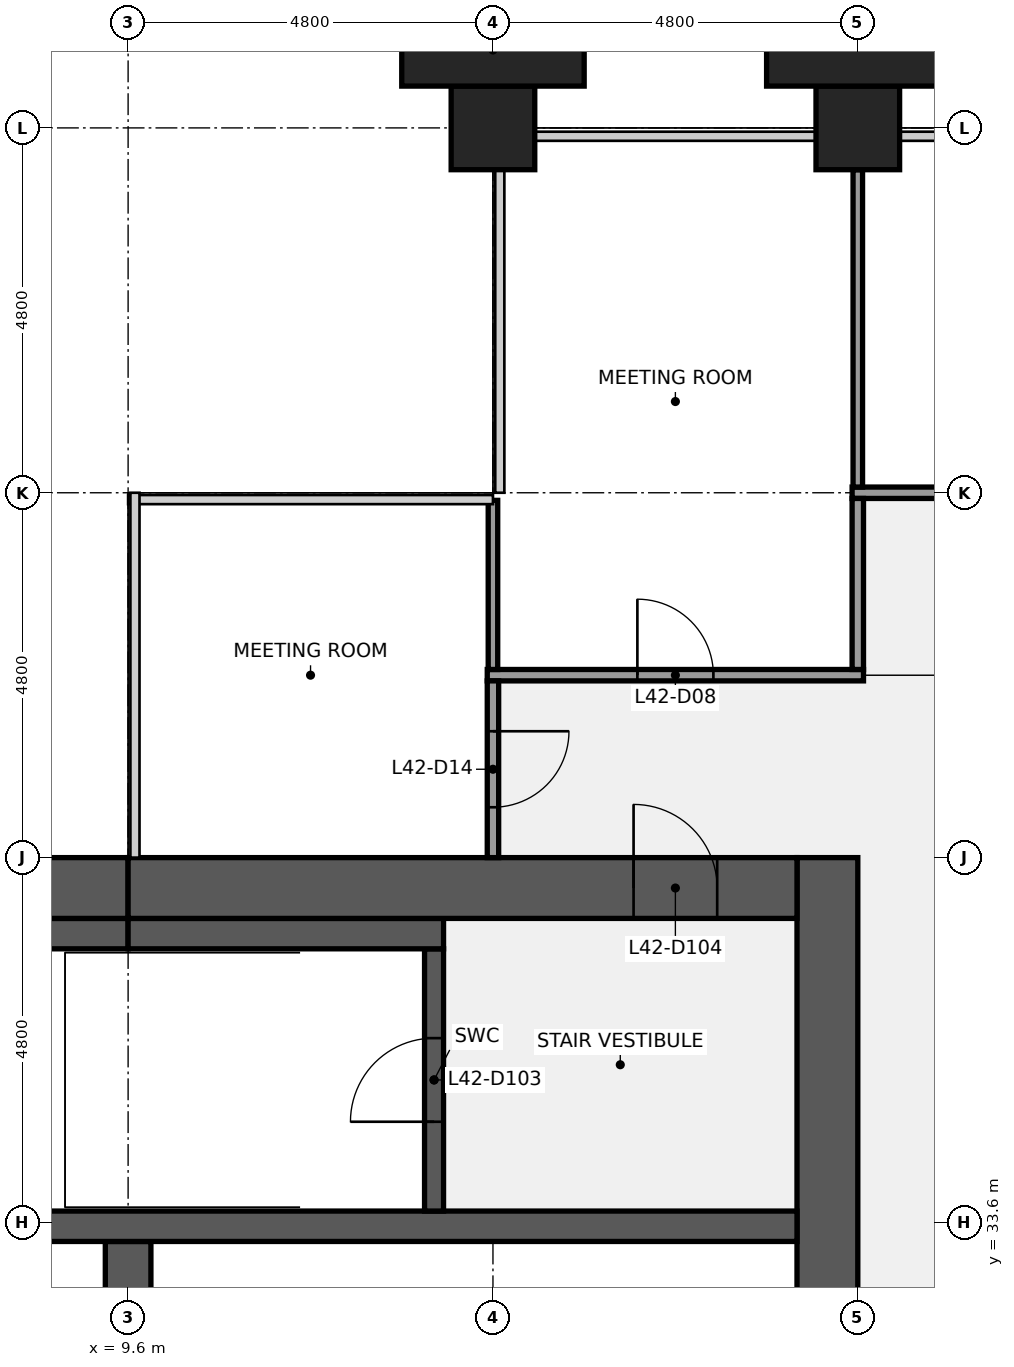
"""IFC4 building model, lengths in metres.
Left out: names, types, materials, properties, quantities, classifications, styles, units other than length and angle.
Written with IfcOpenShell. Run it as: python <this file> out.ifc"""

import sys

from ifc_helpers import new_model, si_unit, direction, frame, frame_2d, origin, origin_2d, place, context, subcontext, project, spatial, rectangle, extrude, element, fill, save


model = new_model("IFC4")
c1 = context("Model", 3, precision=1e-05, world=origin(), true_north=direction((0.0, 1.0)))
c2 = subcontext(c1, "Body", "Model", "MODEL_VIEW")
j1 = project(units=[si_unit("LENGTHUNIT", "METRE"), si_unit("PLANEANGLEUNIT", "RADIAN")], contexts=[c1])
p1 = place(None, origin())
s1 = spatial("IfcSite", under=j1, at=p1, CompositionType="ELEMENT")
p2 = place(p1, origin())
s2 = spatial("IfcBuilding", under=s1, at=p2, CompositionType="ELEMENT")
p3 = place(p2, frame((0.0, 0.0, 197.2)))
s3 = spatial("IfcBuildingStorey", under=s2, at=p3, CompositionType="ELEMENT", Elevation=197.2)
for number, where, z_axis, x_axis in (
    (1, (14.4, 48.0, 0.0), (0.0, 0.0, 1.0), (1.0, 0.0, 0.0)),
    (2, (19.2, 48.0, 0.0), (0.0, 0.0, 1.0), (1.0, 0.0, 0.0)),
):
    element("IfcColumn", number, at=place(p3, frame(where, z_axis=z_axis, x_axis=x_axis)), inside=s3, PredefinedType="COLUMN", context=c2, shape_type="SweptSolid", body=[
        extrude(rectangle(XDim=1.1, YDim=1.1, at=origin_2d()), origin(), (0.0, 0.0, 1.0), 4.0),
    ])
p4 = place(p3, frame((18.8, 38.4, 0.0), z_axis=(0.0, 0.0, 1.0), x_axis=(0.0, -1.0, 0.0)))
e3 = element("IfcWall", 3, at=p4, inside=s3, PredefinedType="SHEAR", context=c2, shape_type="SweptSolid", body=[
    extrude(rectangle(XDim=28.8, YDim=0.8, at=frame_2d((14.4, 0.0))), origin(), (0.0, 0.0, 1.0), 3.84),
])
p5 = place(p4, frame((18.3, 0.0, 0.0)))
e4 = element("IfcOpeningElement", 4, at=p5, cuts=e3, PredefinedType="OPENING", context=c2, shape_type="SweptSolid", body=[
    extrude(rectangle(XDim=1.8, YDim=2.1, at=frame_2d((0.9, 1.05))), frame((0.0, 0.41, 0.0), z_axis=(0.0, -1.0, 0.0), x_axis=(1.0, 0.0, 0.0)), (0.0, 0.0, 1.0), 0.82),
])
p6 = place(p4, frame((8.7, 0.0, 0.0)))
e5 = element("IfcOpeningElement", 5, at=p6, cuts=e3, PredefinedType="OPENING", context=c2, shape_type="SweptSolid", body=[
    extrude(rectangle(XDim=1.8, YDim=2.1, at=frame_2d((0.9, 1.05))), frame((0.0, 0.41, 0.0), z_axis=(0.0, -1.0, 0.0), x_axis=(1.0, 0.0, 0.0)), (0.0, 0.0, 1.0), 0.82),
])
p7 = place(p3, frame((9.6, 30.75, 0.0), z_axis=(0.0, 0.0, 1.0), x_axis=(0.0, 1.0, 0.0)))
e6 = element("IfcWall", 6, at=p7, inside=s3, PredefinedType="SHEAR", context=c2, shape_type="SweptSolid", body=[
    extrude(rectangle(XDim=2.6, YDim=0.6, at=frame_2d((1.3, 0.0))), origin(), (0.0, 0.0, 1.0), 3.84),
])
p8 = place(p3, frame((0.8, 33.55, 0.0), z_axis=(0.0, 0.0, 1.0), x_axis=(1.0, 0.0, 0.0)))
e7 = element("IfcWall", 7, at=p8, inside=s3, PredefinedType="SHEAR", context=c2, shape_type="SweptSolid", body=[
    extrude(rectangle(XDim=17.6, YDim=0.4, at=frame_2d((8.8, 0.0))), origin(), (0.0, 0.0, 1.0), 3.84),
])
p9 = place(p3, frame((13.625, 33.75, 0.0), z_axis=(0.0, 0.0, 1.0), x_axis=(0.0, 1.0, 0.0)))
e8 = element("IfcWall", 8, at=p9, inside=s3, PredefinedType="SHEAR", context=c2, shape_type="SweptSolid", body=[
    extrude(rectangle(XDim=3.45, YDim=0.25, at=frame_2d((1.725, 0.0))), origin(), (0.0, 0.0, 1.0), 3.84),
])
p10 = place(p9, frame((1.175, 0.0, 0.0)))
e9 = element("IfcOpeningElement", 9, at=p10, cuts=e8, PredefinedType="OPENING", context=c2, shape_type="SweptSolid", body=[
    extrude(rectangle(XDim=1.1, YDim=2.1, at=frame_2d((0.55, 1.05))), frame((0.0, 0.135, 0.0), z_axis=(0.0, -1.0, 0.0), x_axis=(1.0, 0.0, 0.0)), (0.0, 0.0, 1.0), 0.27),
])
p11 = place(p3, frame((6.25, 37.4, 0.0), z_axis=(0.0, 0.0, 1.0), x_axis=(1.0, 0.0, 0.0)))
e10 = element("IfcWall", 10, at=p11, inside=s3, PredefinedType="SHEAR", context=c2, shape_type="SweptSolid", body=[
    extrude(rectangle(XDim=3.35, YDim=0.4, at=frame_2d((1.675, 0.0))), origin(), (0.0, 0.0, 1.0), 3.84),
])
p12 = place(p3, frame((9.6, 37.4, 0.0), z_axis=(0.0, 0.0, 1.0), x_axis=(1.0, 0.0, 0.0)))
e11 = element("IfcWall", 11, at=p12, inside=s3, PredefinedType="SHEAR", context=c2, shape_type="SweptSolid", body=[
    extrude(rectangle(XDim=4.15, YDim=0.4, at=frame_2d((2.075, 0.0))), origin(), (0.0, 0.0, 1.0), 3.84),
])
p13 = place(p3, frame((0.8, 38.0, 0.0), z_axis=(0.0, 0.0, 1.0), x_axis=(1.0, 0.0, 0.0)))
e12 = element("IfcWall", 12, at=p13, inside=s3, PredefinedType="SHEAR", context=c2, shape_type="SweptSolid", body=[
    extrude(rectangle(XDim=8.8, YDim=0.8, at=frame_2d((4.4, 0.0))), origin(), (0.0, 0.0, 1.0), 3.84),
])
p14 = place(p13, frame((5.5, 0.0, 0.9)))
e13 = element("IfcOpeningElement", 13, at=p14, cuts=e12, PredefinedType="OPENING", context=c2, shape_type="SweptSolid", body=[
    extrude(rectangle(XDim=1.8, YDim=1.5, at=frame_2d((0.9, 0.75))), frame((0.0, 0.41, 0.0), z_axis=(0.0, -1.0, 0.0), x_axis=(1.0, 0.0, 0.0)), (0.0, 0.0, 1.0), 0.82),
])
p15 = place(p3, frame((9.6, 38.0, 0.0), z_axis=(0.0, 0.0, 1.0), x_axis=(1.0, 0.0, 0.0)))
e14 = element("IfcWall", 14, at=p15, inside=s3, PredefinedType="SHEAR", context=c2, shape_type="SweptSolid", body=[
    extrude(rectangle(XDim=8.8, YDim=0.8, at=frame_2d((4.4, 0.0))), origin(), (0.0, 0.0, 1.0), 3.84),
])
p16 = place(p15, frame((6.65, 0.0, 0.0)))
e15 = element("IfcOpeningElement", 15, at=p16, cuts=e14, PredefinedType="OPENING", context=c2, shape_type="SweptSolid", body=[
    extrude(rectangle(XDim=1.1, YDim=2.1, at=frame_2d((0.55, 1.05))), frame((0.0, 0.41, 0.0), z_axis=(0.0, -1.0, 0.0), x_axis=(1.0, 0.0, 0.0)), (0.0, 0.0, 1.0), 0.82),
])
p17 = place(p3, frame((14.325, 40.8, 0.0), z_axis=(0.0, 0.0, 1.0), x_axis=(1.0, 0.0, 0.0)))
e16 = element("IfcWall", 16, at=p17, inside=s3, PredefinedType="PARTITIONING", context=c2, shape_type="SweptSolid", body=[
    extrude(rectangle(XDim=4.95, YDim=0.15, at=frame_2d((2.475, 0.0))), origin(), (0.0, 0.0, 1.0), 2.87),
])
p18 = place(p17, frame((1.975, 0.0, 0.0)))
e17 = element("IfcOpeningElement", 17, at=p18, cuts=e16, PredefinedType="OPENING", context=c2, shape_type="SweptSolid", body=[
    extrude(rectangle(XDim=1.0, YDim=2.1, at=frame_2d((0.5, 1.05))), frame((0.0, 0.085, 0.0), z_axis=(0.0, -1.0, 0.0), x_axis=(1.0, 0.0, 0.0)), (0.0, 0.0, 1.0), 0.17),
])
p19 = place(p3, frame((19.125, 43.2, 0.0), z_axis=(0.0, 0.0, 1.0), x_axis=(1.0, 0.0, 0.0)))
e18 = element("IfcWall", 18, at=p19, inside=s3, PredefinedType="PARTITIONING", context=c2, shape_type="SweptSolid", body=[
    extrude(rectangle(XDim=19.35, YDim=0.15, at=frame_2d((9.675, 0.0))), origin(), (0.0, 0.0, 1.0), 2.87),
])
p20 = place(p19, frame((5.575, 0.0, 0.0)))
e19 = element("IfcOpeningElement", 19, at=p20, cuts=e18, PredefinedType="OPENING", context=c2, shape_type="SweptSolid", body=[
    extrude(rectangle(XDim=1.0, YDim=2.1, at=frame_2d((0.5, 1.05))), frame((0.0, 0.085, 0.0), z_axis=(0.0, -1.0, 0.0), x_axis=(1.0, 0.0, 0.0)), (0.0, 0.0, 1.0), 0.17),
])
p21 = place(p19, frame((13.975, 0.0, 0.0)))
e20 = element("IfcOpeningElement", 20, at=p21, cuts=e18, PredefinedType="OPENING", context=c2, shape_type="SweptSolid", body=[
    extrude(rectangle(XDim=1.0, YDim=2.1, at=frame_2d((0.5, 1.05))), frame((0.0, 0.085, 0.0), z_axis=(0.0, -1.0, 0.0), x_axis=(1.0, 0.0, 0.0)), (0.0, 0.0, 1.0), 0.17),
])
p22 = place(p19, frame((17.575, 0.0, 0.0)))
e21 = element("IfcOpeningElement", 21, at=p22, cuts=e18, PredefinedType="OPENING", context=c2, shape_type="SweptSolid", body=[
    extrude(rectangle(XDim=1.0, YDim=2.1, at=frame_2d((0.5, 1.05))), frame((0.0, 0.085, 0.0), z_axis=(0.0, -1.0, 0.0), x_axis=(1.0, 0.0, 0.0)), (0.0, 0.0, 1.0), 0.17),
])
p23 = place(p3, frame((14.4, 40.875, 0.0), z_axis=(0.0, 0.0, 1.0), x_axis=(0.0, 1.0, 0.0)))
e22 = element("IfcWall", 22, at=p23, inside=s3, PredefinedType="PARTITIONING", context=c2, shape_type="SweptSolid", body=[
    extrude(rectangle(XDim=2.225, YDim=0.125, at=frame_2d((1.113, 0.0))), origin(), (0.0, 0.0, 1.0), 2.87),
])
p24 = place(p3, frame((14.4, 38.4, 0.0), z_axis=(0.0, 0.0, 1.0), x_axis=(0.0, 1.0, 0.0)))
e23 = element("IfcWall", 23, at=p24, inside=s3, PredefinedType="PARTITIONING", context=c2, shape_type="SweptSolid", body=[
    extrude(rectangle(XDim=2.325, YDim=0.15, at=frame_2d((1.163, 0.0))), origin(), (0.0, 0.0, 1.0), 2.87),
])
p25 = place(p24, frame((0.663, 0.0, 0.0)))
e24 = element("IfcOpeningElement", 24, at=p25, cuts=e23, PredefinedType="OPENING", context=c2, shape_type="SweptSolid", body=[
    extrude(rectangle(XDim=1.0, YDim=2.1, at=frame_2d((0.5, 1.05))), frame((0.0, 0.085, 0.0), z_axis=(0.0, -1.0, 0.0), x_axis=(1.0, 0.0, 0.0)), (0.0, 0.0, 1.0), 0.17),
])
p26 = place(p3, frame((19.2, 43.275, 0.0), z_axis=(0.0, 0.0, 1.0), x_axis=(0.0, 1.0, 0.0)))
e25 = element("IfcWall", 25, at=p26, inside=s3, PredefinedType="PARTITIONING", context=c2, shape_type="SweptSolid", body=[
    extrude(rectangle(XDim=4.175, YDim=0.125, at=frame_2d((2.087, 0.0))), origin(), (0.0, 0.0, 1.0), 2.87),
])
p27 = place(p3, frame((19.2, 40.875, 0.0), z_axis=(0.0, 0.0, 1.0), x_axis=(0.0, 1.0, 0.0)))
e26 = element("IfcWall", 26, at=p27, inside=s3, PredefinedType="PARTITIONING", context=c2, shape_type="SweptSolid", body=[
    extrude(rectangle(XDim=2.25, YDim=0.15, at=frame_2d((1.125, 0.0))), origin(), (0.0, 0.0, 1.0), 2.87),
])
for number, where, z_axis, x_axis in (
    (27, (14.4, 49.025, 0.0), (0.0, 0.0, 1.0), (1.0, 0.0, 0.0)),
    (28, (19.2, 49.025, 0.0), (0.0, 0.0, 1.0), (1.0, 0.0, 0.0)),
):
    element("IfcColumn", number, at=place(p3, frame(where, z_axis=z_axis, x_axis=x_axis)), inside=s3, PredefinedType="PILASTER", context=c2, shape_type="SweptSolid", body=[
        extrude(rectangle(XDim=2.4, YDim=0.95, at=origin_2d()), origin(), (0.0, 0.0, 1.0), 4.0),
    ])
p28 = place(p10, origin())
e29 = element("IfcDoor", 29, at=p28, inside=s3, OperationType="SINGLE_SWING_LEFT", PredefinedType="DOOR", context=c2, shape_type="SweptSolid", body=[
    extrude(rectangle(XDim=1.1, YDim=2.1, at=frame_2d((0.55, 1.05))), frame((0.0, 0.025, 0.0), z_axis=(0.0, -1.0, 0.0), x_axis=(1.0, 0.0, 0.0)), (0.0, 0.0, 1.0), 0.05),
])
fill(e9, e29)
p29 = place(p16, origin())
e30 = element("IfcDoor", 30, at=p29, inside=s3, OperationType="SINGLE_SWING_LEFT", PredefinedType="DOOR", context=c2, shape_type="SweptSolid", body=[
    extrude(rectangle(XDim=1.1, YDim=2.1, at=frame_2d((0.55, 1.05))), frame((0.0, 0.025, 0.0), z_axis=(0.0, -1.0, 0.0), x_axis=(1.0, 0.0, 0.0)), (0.0, 0.0, 1.0), 0.05),
])
fill(e15, e30)
p30 = place(p18, origin())
e31 = element("IfcDoor", 31, at=p30, inside=s3, OperationType="SINGLE_SWING_LEFT", PredefinedType="DOOR", context=c2, shape_type="SweptSolid", body=[
    extrude(rectangle(XDim=1.0, YDim=2.1, at=frame_2d((0.5, 1.05))), frame((0.0, 0.025, 0.0), z_axis=(0.0, -1.0, 0.0), x_axis=(1.0, 0.0, 0.0)), (0.0, 0.0, 1.0), 0.05),
])
fill(e17, e31)
p31 = place(p25, origin())
e32 = element("IfcDoor", 32, at=p31, inside=s3, OperationType="SINGLE_SWING_RIGHT", PredefinedType="DOOR", context=c2, shape_type="SweptSolid", body=[
    extrude(rectangle(XDim=1.0, YDim=2.1, at=frame_2d((0.5, 1.05))), frame((0.0, 0.025, 0.0), z_axis=(0.0, -1.0, 0.0), x_axis=(1.0, 0.0, 0.0)), (0.0, 0.0, 1.0), 0.05),
])
fill(e24, e32)
save(model, sys.argv[1])
